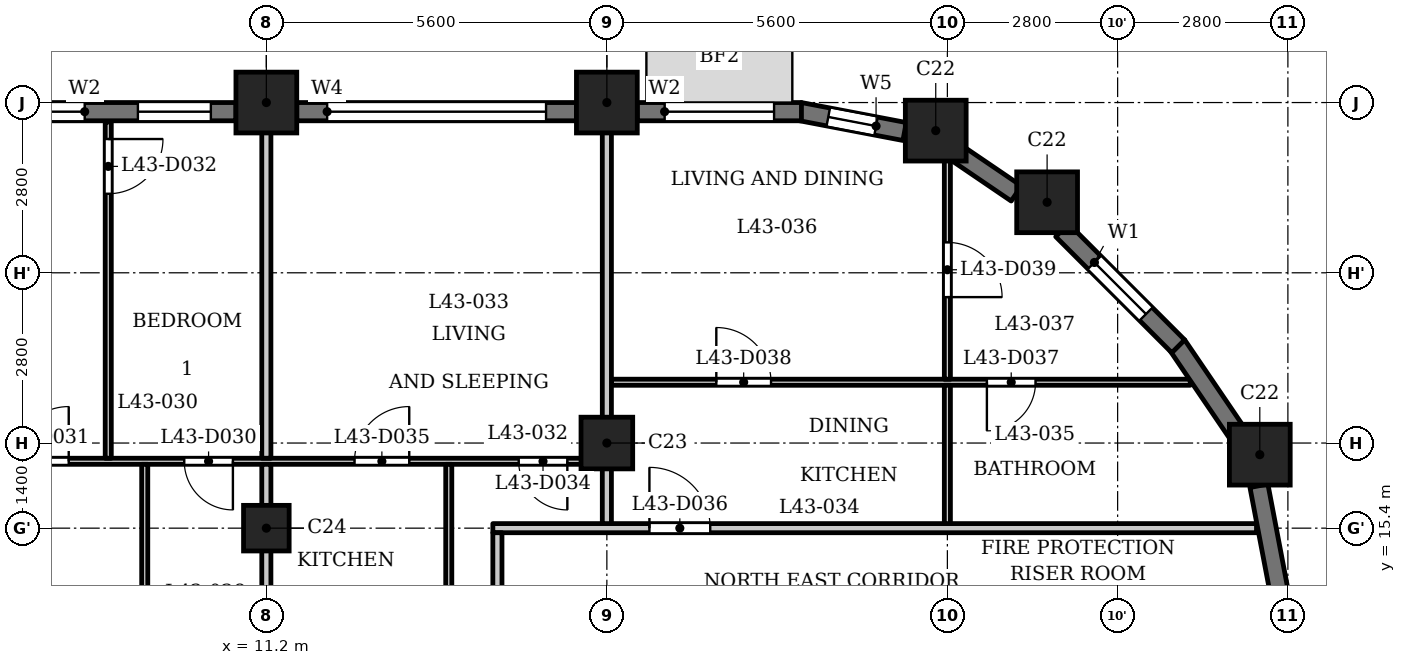
"""IFC4 building model, lengths in metres.
Left out: names, types, materials, properties, quantities, classifications, styles, units other than length and angle.
Written with IfcOpenShell. Run it as: python <this file> out.ifc"""

import sys

from ifc_helpers import new_model, si_unit, direction, frame, frame_2d, origin, origin_2d, place, context, subcontext, project, spatial, rectangle, extrude, element, fill, save


model = new_model("IFC4")
c1 = context("Model", 3, precision=1e-05, world=origin(), true_north=direction((0.0, 1.0)))
c2 = subcontext(c1, "Body", "Model", "MODEL_VIEW")
j1 = project(units=[si_unit("LENGTHUNIT", "METRE"), si_unit("PLANEANGLEUNIT", "RADIAN")], contexts=[c1])
p1 = place(None, origin())
s1 = spatial("IfcSite", under=j1, at=p1, CompositionType="ELEMENT")
p2 = place(p1, origin())
s2 = spatial("IfcBuilding", under=s1, at=p2, CompositionType="ELEMENT")
p3 = place(p2, frame((0.0, 0.0, 167.6)))
s3 = spatial("IfcBuildingStorey", under=s2, at=p3, CompositionType="ELEMENT", Elevation=167.6)
for number, where, z_axis, x_axis in (
    (1, (27.538, 16.609, 0.0), (0.0, 0.0, 1.0), (1.0, 0.0, 0.0)),
    (2, (24.04, 20.76, 0.0), (0.0, 0.0, 1.0), (1.0, 0.0, 0.0)),
    (3, (22.209, 21.938, 0.0), (0.0, 0.0, 1.0), (1.0, 0.0, 0.0)),
    (4, (16.8, 22.4, 0.0), (0.0, 0.0, 1.0), (1.0, 0.0, 0.0)),
    (5, (11.2, 22.4, 0.0), (0.0, 0.0, 1.0), (1.0, 0.0, 0.0)),
):
    element("IfcColumn", number, at=place(p3, frame(where, z_axis=z_axis, x_axis=x_axis)), inside=s3, PredefinedType="COLUMN", context=c2, shape_type="SweptSolid", body=[
        extrude(rectangle(XDim=1.0, YDim=1.0, at=origin_2d()), origin(), (0.0, 0.0, 1.0), 3.5),
    ])
p4 = place(p3, frame((16.8, 16.8, 0.0), z_axis=(0.0, 0.0, 1.0), x_axis=(1.0, 0.0, 0.0)))
e6 = element("IfcColumn", 6, at=p4, inside=s3, PredefinedType="COLUMN", context=c2, shape_type="SweptSolid", body=[
    extrude(rectangle(XDim=0.85, YDim=0.85, at=origin_2d()), origin(), (0.0, 0.0, 1.0), 3.5),
])
p5 = place(p3, frame((11.2, 15.4, 0.0), z_axis=(0.0, 0.0, 1.0), x_axis=(1.0, 0.0, 0.0)))
e7 = element("IfcColumn", 7, at=p5, inside=s3, PredefinedType="COLUMN", context=c2, shape_type="SweptSolid", body=[
    extrude(rectangle(XDim=0.75, YDim=0.75, at=origin_2d()), origin(), (0.0, 0.0, 1.0), 3.5),
])
for number, where, z_axis, x_axis in (
    (8, (27.853, 14.372, 0.0), (0.0, 0.0, 1.0), (-0.187, 0.982, 0.0)),
    (9, (27.166, 16.96, 0.0), (0.0, 0.0, 1.0), (-0.562, 0.827, 0.0)),
):
    element("IfcWall", number, at=place(p3, frame(where, z_axis=z_axis, x_axis=x_axis)), inside=s3, PredefinedType="SOLIDWALL", context=c2, shape_type="SweptSolid", body=[
        extrude(rectangle(XDim=1.756, YDim=0.3, at=frame_2d((0.878, 0.0))), origin(), (0.0, 0.0, 1.0), 2.45),
    ])
p6 = place(p3, frame((26.197, 18.391, 0.0), z_axis=(0.0, 0.0, 1.0), x_axis=(-0.707061571201, 0.707151988282, 0.0)))
e10 = element("IfcWall", 10, at=p6, inside=s3, PredefinedType="SOLIDWALL", context=c2, shape_type="SweptSolid", body=[
    extrude(rectangle(XDim=2.7, YDim=0.3, at=frame_2d((1.35, 0.0))), origin(), (0.0, 0.0, 1.0), 2.45),
])
p7 = place(p6, frame((0.75, 0.0, 0.6)))
e11 = element("IfcOpeningElement", 11, at=p7, cuts=e10, PredefinedType="OPENING", context=c2, shape_type="SweptSolid", body=[
    extrude(rectangle(XDim=1.2, YDim=1.55, at=frame_2d((0.6, 0.775))), frame((0.0, 0.16, 0.0), z_axis=(0.0, -1.0, 0.0), x_axis=(1.0, 0.0, 0.0)), (0.0, 0.0, 1.0), 0.32),
])
p8 = place(p3, frame((23.534, 20.904, 0.0), z_axis=(0.0, 0.0, 1.0), x_axis=(-0.827103906596, 0.56204904385, 0.0)))
e12 = element("IfcWall", 12, at=p8, inside=s3, PredefinedType="SOLIDWALL", context=c2, shape_type="SweptSolid", body=[
    extrude(rectangle(XDim=1.177, YDim=0.3, at=frame_2d((0.589, 0.0))), origin(), (0.0, 0.0, 1.0), 3.2),
])
p9 = place(p3, frame((21.697, 21.924, 0.0), z_axis=(0.0, 0.0, 1.0), x_axis=(-0.982284988433, 0.187393173565, 0.0)))
e13 = element("IfcWall", 13, at=p9, inside=s3, PredefinedType="SOLIDWALL", context=c2, shape_type="SweptSolid", body=[
    extrude(rectangle(XDim=1.756, YDim=0.3, at=frame_2d((0.878, 0.0))), origin(), (0.0, 0.0, 1.0), 2.45),
])
p10 = place(p9, frame((0.478, 0.0, 0.6)))
e14 = element("IfcOpeningElement", 14, at=p10, cuts=e13, PredefinedType="OPENING", context=c2, shape_type="SweptSolid", body=[
    extrude(rectangle(XDim=0.8, YDim=1.55, at=frame_2d((0.4, 0.775))), frame((0.0, 0.16, 0.0), z_axis=(0.0, -1.0, 0.0), x_axis=(1.0, 0.0, 0.0)), (0.0, 0.0, 1.0), 0.32),
])
p11 = place(p3, frame((20.0, 22.25, 0.0), z_axis=(0.0, 0.0, 1.0), x_axis=(-1.0, 0.0, 0.0)))
e15 = element("IfcWall", 15, at=p11, inside=s3, PredefinedType="SOLIDWALL", context=c2, shape_type="SweptSolid", body=[
    extrude(rectangle(XDim=2.7, YDim=0.3, at=frame_2d((1.35, 0.0))), origin(), (0.0, 0.0, 1.0), 2.45),
])
p12 = place(p11, frame((0.45, 0.0, 0.9)))
e16 = element("IfcOpeningElement", 16, at=p12, cuts=e15, PredefinedType="OPENING", context=c2, shape_type="SweptSolid", body=[
    extrude(rectangle(XDim=1.8, YDim=1.25, at=frame_2d((0.9, 0.625))), frame((0.0, 0.16, 0.0), z_axis=(0.0, -1.0, 0.0), x_axis=(1.0, 0.0, 0.0)), (0.0, 0.0, 1.0), 0.32),
])
p13 = place(p3, frame((16.3, 22.25, 0.0), z_axis=(0.0, 0.0, 1.0), x_axis=(-1.0, 0.0, 0.0)))
e17 = element("IfcWall", 17, at=p13, inside=s3, PredefinedType="SOLIDWALL", context=c2, shape_type="SweptSolid", body=[
    extrude(rectangle(XDim=4.6, YDim=0.3, at=frame_2d((2.3, 0.0))), origin(), (0.0, 0.0, 1.0), 2.45),
])
p14 = place(p13, frame((0.5, 0.0, 1.2)))
e18 = element("IfcOpeningElement", 18, at=p14, cuts=e17, PredefinedType="OPENING", context=c2, shape_type="SweptSolid", body=[
    extrude(rectangle(XDim=3.6, YDim=0.95, at=frame_2d((1.8, 0.475))), frame((0.0, 0.16, 0.0), z_axis=(0.0, -1.0, 0.0), x_axis=(1.0, 0.0, 0.0)), (0.0, 0.0, 1.0), 0.32),
])
p15 = place(p3, frame((10.7, 22.25, 0.0), z_axis=(0.0, 0.0, 1.0), x_axis=(-1.0, 0.0, 0.0)))
e19 = element("IfcWall", 19, at=p15, inside=s3, PredefinedType="SOLIDWALL", context=c2, shape_type="SweptSolid", body=[
    extrude(rectangle(XDim=4.6, YDim=0.3, at=frame_2d((2.3, 0.0))), origin(), (0.0, 0.0, 1.0), 2.45),
])
p16 = place(p15, frame((0.413, 0.0, 0.6)))
e20 = element("IfcOpeningElement", 20, at=p16, cuts=e19, PredefinedType="OPENING", context=c2, shape_type="SweptSolid", body=[
    extrude(rectangle(XDim=1.2, YDim=1.55, at=frame_2d((0.6, 0.775))), frame((0.0, 0.16, 0.0), z_axis=(0.0, -1.0, 0.0), x_axis=(1.0, 0.0, 0.0)), (0.0, 0.0, 1.0), 0.32),
])
p17 = place(p15, frame((2.488, 0.0, 0.9)))
e21 = element("IfcOpeningElement", 21, at=p17, cuts=e19, PredefinedType="OPENING", context=c2, shape_type="SweptSolid", body=[
    extrude(rectangle(XDim=1.8, YDim=1.25, at=frame_2d((0.9, 0.625))), frame((0.0, 0.16, 0.0), z_axis=(0.0, -1.0, 0.0), x_axis=(1.0, 0.0, 0.0)), (0.0, 0.0, 1.0), 0.32),
])
p18 = place(p3, frame((14.925, 15.4, 0.0), z_axis=(0.0, 0.0, 1.0), x_axis=(1.0, 0.0, 0.0)))
e22 = element("IfcWall", 22, at=p18, inside=s3, PredefinedType="PARTITIONING", context=c2, shape_type="SweptSolid", body=[
    extrude(rectangle(XDim=12.559, YDim=0.15, at=frame_2d((6.279, 0.0))), origin(), (0.0, 0.0, 1.0), 3.2),
])
p19 = place(p18, frame((2.575, 0.0, 0.0)))
e23 = element("IfcOpeningElement", 23, at=p19, cuts=e22, PredefinedType="OPENING", context=c2, shape_type="SweptSolid", body=[
    extrude(rectangle(XDim=1.0, YDim=2.1, at=frame_2d((0.5, 1.05))), frame((0.0, 0.085, 0.0), z_axis=(0.0, -1.0, 0.0), x_axis=(1.0, 0.0, 0.0)), (0.0, 0.0, 1.0), 0.17),
])
p20 = place(p3, frame((-16.725, 16.5, 0.0), z_axis=(0.0, 0.0, 1.0), x_axis=(1.0, 0.0, 0.0)))
e24 = element("IfcWall", 24, at=p20, inside=s3, PredefinedType="PARTITIONING", context=c2, shape_type="SweptSolid", body=[
    extrude(rectangle(XDim=33.45, YDim=0.1, at=frame_2d((16.725, 0.0))), origin(), (0.0, 0.0, 1.0), 3.2),
])
p21 = place(p20, frame((0.575, 0.0, 0.0)))
e25 = element("IfcOpeningElement", 25, at=p21, cuts=e24, PredefinedType="OPENING", context=c2, shape_type="SweptSolid", body=[
    extrude(rectangle(XDim=0.8, YDim=2.1, at=frame_2d((0.4, 1.05))), frame((0.0, 0.06, 0.0), z_axis=(0.0, -1.0, 0.0), x_axis=(1.0, 0.0, 0.0)), (0.0, 0.0, 1.0), 0.12),
])
p22 = place(p20, frame((3.225, 0.0, 0.0)))
e26 = element("IfcOpeningElement", 26, at=p22, cuts=e24, PredefinedType="OPENING", context=c2, shape_type="SweptSolid", body=[
    extrude(rectangle(XDim=0.9, YDim=2.1, at=frame_2d((0.45, 1.05))), frame((0.0, 0.06, 0.0), z_axis=(0.0, -1.0, 0.0), x_axis=(1.0, 0.0, 0.0)), (0.0, 0.0, 1.0), 0.12),
])
p23 = place(p20, frame((6.775, 0.0, 0.0)))
e27 = element("IfcOpeningElement", 27, at=p23, cuts=e24, PredefinedType="OPENING", context=c2, shape_type="SweptSolid", body=[
    extrude(rectangle(XDim=0.9, YDim=2.1, at=frame_2d((0.45, 1.05))), frame((0.0, 0.06, 0.0), z_axis=(0.0, -1.0, 0.0), x_axis=(1.0, 0.0, 0.0)), (0.0, 0.0, 1.0), 0.12),
])
p24 = place(p20, frame((8.825, 0.0, 0.0)))
e28 = element("IfcOpeningElement", 28, at=p24, cuts=e24, PredefinedType="OPENING", context=c2, shape_type="SweptSolid", body=[
    extrude(rectangle(XDim=0.9, YDim=2.1, at=frame_2d((0.45, 1.05))), frame((0.0, 0.06, 0.0), z_axis=(0.0, -1.0, 0.0), x_axis=(1.0, 0.0, 0.0)), (0.0, 0.0, 1.0), 0.12),
])
p25 = place(p20, frame((20.775, 0.0, 0.0)))
e29 = element("IfcOpeningElement", 29, at=p25, cuts=e24, PredefinedType="OPENING", context=c2, shape_type="SweptSolid", body=[
    extrude(rectangle(XDim=0.8, YDim=2.1, at=frame_2d((0.4, 1.05))), frame((0.0, 0.06, 0.0), z_axis=(0.0, -1.0, 0.0), x_axis=(1.0, 0.0, 0.0)), (0.0, 0.0, 1.0), 0.12),
])
p26 = place(p20, frame((17.325, 0.0, 0.0)))
e30 = element("IfcOpeningElement", 30, at=p26, cuts=e24, PredefinedType="OPENING", context=c2, shape_type="SweptSolid", body=[
    extrude(rectangle(XDim=0.9, YDim=2.1, at=frame_2d((0.45, 1.05))), frame((0.0, 0.06, 0.0), z_axis=(0.0, -1.0, 0.0), x_axis=(1.0, 0.0, 0.0)), (0.0, 0.0, 1.0), 0.12),
])
p27 = place(p20, frame((12.375, 0.0, 0.0)))
e31 = element("IfcOpeningElement", 31, at=p27, cuts=e24, PredefinedType="OPENING", context=c2, shape_type="SweptSolid", body=[
    extrude(rectangle(XDim=0.9, YDim=2.1, at=frame_2d((0.45, 1.05))), frame((0.0, 0.06, 0.0), z_axis=(0.0, -1.0, 0.0), x_axis=(1.0, 0.0, 0.0)), (0.0, 0.0, 1.0), 0.12),
])
p28 = place(p20, frame((14.425, 0.0, 0.0)))
e32 = element("IfcOpeningElement", 32, at=p28, cuts=e24, PredefinedType="OPENING", context=c2, shape_type="SweptSolid", body=[
    extrude(rectangle(XDim=0.9, YDim=2.1, at=frame_2d((0.45, 1.05))), frame((0.0, 0.06, 0.0), z_axis=(0.0, -1.0, 0.0), x_axis=(1.0, 0.0, 0.0)), (0.0, 0.0, 1.0), 0.12),
])
p29 = place(p20, frame((26.575, 0.0, 0.0)))
e33 = element("IfcOpeningElement", 33, at=p29, cuts=e24, PredefinedType="OPENING", context=c2, shape_type="SweptSolid", body=[
    extrude(rectangle(XDim=0.8, YDim=2.1, at=frame_2d((0.4, 1.05))), frame((0.0, 0.06, 0.0), z_axis=(0.0, -1.0, 0.0), x_axis=(1.0, 0.0, 0.0)), (0.0, 0.0, 1.0), 0.12),
])
p30 = place(p20, frame((23.775, 0.0, 0.0)))
e34 = element("IfcOpeningElement", 34, at=p30, cuts=e24, PredefinedType="OPENING", context=c2, shape_type="SweptSolid", body=[
    extrude(rectangle(XDim=0.9, YDim=2.1, at=frame_2d((0.45, 1.05))), frame((0.0, 0.06, 0.0), z_axis=(0.0, -1.0, 0.0), x_axis=(1.0, 0.0, 0.0)), (0.0, 0.0, 1.0), 0.12),
])
p31 = place(p20, frame((32.075, 0.0, 0.0)))
e35 = element("IfcOpeningElement", 35, at=p31, cuts=e24, PredefinedType="OPENING", context=c2, shape_type="SweptSolid", body=[
    extrude(rectangle(XDim=0.8, YDim=2.1, at=frame_2d((0.4, 1.05))), frame((0.0, 0.06, 0.0), z_axis=(0.0, -1.0, 0.0), x_axis=(1.0, 0.0, 0.0)), (0.0, 0.0, 1.0), 0.12),
])
p32 = place(p20, frame((29.375, 0.0, 0.0)))
e36 = element("IfcOpeningElement", 36, at=p32, cuts=e24, PredefinedType="OPENING", context=c2, shape_type="SweptSolid", body=[
    extrude(rectangle(XDim=0.9, YDim=2.1, at=frame_2d((0.45, 1.05))), frame((0.0, 0.06, 0.0), z_axis=(0.0, -1.0, 0.0), x_axis=(1.0, 0.0, 0.0)), (0.0, 0.0, 1.0), 0.12),
])
p33 = place(p3, frame((16.875, 17.8, 0.0), z_axis=(0.0, 0.0, 1.0), x_axis=(1.0, 0.0, 0.0)))
e37 = element("IfcWall", 37, at=p33, inside=s3, PredefinedType="PARTITIONING", context=c2, shape_type="SweptSolid", body=[
    extrude(rectangle(XDim=9.519, YDim=0.1, at=frame_2d((4.76, 0.0))), origin(), (0.0, 0.0, 1.0), 3.2),
])
p34 = place(p33, frame((6.175, 0.0, 0.0)))
e38 = element("IfcOpeningElement", 38, at=p34, cuts=e37, PredefinedType="OPENING", context=c2, shape_type="SweptSolid", body=[
    extrude(rectangle(XDim=0.8, YDim=2.1, at=frame_2d((0.4, 1.05))), frame((0.0, 0.06, 0.0), z_axis=(0.0, -1.0, 0.0), x_axis=(1.0, 0.0, 0.0)), (0.0, 0.0, 1.0), 0.12),
])
p35 = place(p33, frame((1.725, 0.0, 0.0)))
e39 = element("IfcOpeningElement", 39, at=p35, cuts=e37, PredefinedType="OPENING", context=c2, shape_type="SweptSolid", body=[
    extrude(rectangle(XDim=0.9, YDim=2.1, at=frame_2d((0.45, 1.05))), frame((0.0, 0.06, 0.0), z_axis=(0.0, -1.0, 0.0), x_axis=(1.0, 0.0, 0.0)), (0.0, 0.0, 1.0), 0.12),
])
p36 = place(p3, frame((8.6, 16.55, 0.0), z_axis=(0.0, 0.0, 1.0), x_axis=(0.0, 1.0, 0.0)))
e40 = element("IfcWall", 40, at=p36, inside=s3, PredefinedType="PARTITIONING", context=c2, shape_type="SweptSolid", body=[
    extrude(rectangle(XDim=5.53, YDim=0.1, at=frame_2d((2.765, 0.0))), origin(), (0.0, 0.0, 1.0), 3.2),
])
p37 = place(p36, frame((4.35, 0.0, 0.0)))
e41 = element("IfcOpeningElement", 41, at=p37, cuts=e40, PredefinedType="OPENING", context=c2, shape_type="SweptSolid", body=[
    extrude(rectangle(XDim=0.9, YDim=2.1, at=frame_2d((0.45, 1.05))), frame((0.0, 0.06, 0.0), z_axis=(0.0, -1.0, 0.0), x_axis=(1.0, 0.0, 0.0)), (0.0, 0.0, 1.0), 0.12),
])
p38 = place(p3, frame((9.2, 13.275, 0.0), z_axis=(0.0, 0.0, 1.0), x_axis=(0.0, 1.0, 0.0)))
e42 = element("IfcWall", 42, at=p38, inside=s3, PredefinedType="PARTITIONING", context=c2, shape_type="SweptSolid", body=[
    extrude(rectangle(XDim=3.175, YDim=0.1, at=frame_2d((1.587, 0.0))), origin(), (0.0, 0.0, 1.0), 3.2),
])
p39 = place(p3, frame((11.2, 13.275, 0.0), z_axis=(0.0, 0.0, 1.0), x_axis=(0.0, 1.0, 0.0)))
e43 = element("IfcWall", 43, at=p39, inside=s3, PredefinedType="PARTITIONING", context=c2, shape_type="SweptSolid", body=[
    extrude(rectangle(XDim=3.175, YDim=0.15, at=frame_2d((1.587, 0.0))), origin(), (0.0, 0.0, 1.0), 3.2),
])
p40 = place(p3, frame((11.2, 16.55, 0.0), z_axis=(0.0, 0.0, 1.0), x_axis=(0.0, 1.0, 0.0)))
e44 = element("IfcWall", 44, at=p40, inside=s3, PredefinedType="PARTITIONING", context=c2, shape_type="SweptSolid", body=[
    extrude(rectangle(XDim=6.33, YDim=0.15, at=frame_2d((3.165, 0.0))), origin(), (0.0, 0.0, 1.0), 3.2),
])
p41 = place(p3, frame((14.2, 13.275, 0.0), z_axis=(0.0, 0.0, 1.0), x_axis=(0.0, 1.0, 0.0)))
e45 = element("IfcWall", 45, at=p41, inside=s3, PredefinedType="PARTITIONING", context=c2, shape_type="SweptSolid", body=[
    extrude(rectangle(XDim=3.175, YDim=0.1, at=frame_2d((1.587, 0.0))), origin(), (0.0, 0.0, 1.0), 3.2),
])
p42 = place(p3, frame((15.0, 13.275, 0.0), z_axis=(0.0, 0.0, 1.0), x_axis=(0.0, 1.0, 0.0)))
e46 = element("IfcWall", 46, at=p42, inside=s3, PredefinedType="PARTITIONING", context=c2, shape_type="SweptSolid", body=[
    extrude(rectangle(XDim=2.05, YDim=0.15, at=frame_2d((1.025, 0.0))), origin(), (0.0, 0.0, 1.0), 3.2),
])
p43 = place(p3, frame((16.8, 15.475, 0.0), z_axis=(0.0, 0.0, 1.0), x_axis=(0.0, 1.0, 0.0)))
e47 = element("IfcWall", 47, at=p43, inside=s3, PredefinedType="PARTITIONING", context=c2, shape_type="SweptSolid", body=[
    extrude(rectangle(XDim=7.405, YDim=0.15, at=frame_2d((3.702, 0.0))), origin(), (0.0, 0.0, 1.0), 3.2),
])
p44 = place(p3, frame((22.4, 15.475, 0.0), z_axis=(0.0, 0.0, 1.0), x_axis=(0.0, 1.0, 0.0)))
e48 = element("IfcWall", 48, at=p44, inside=s3, PredefinedType="PARTITIONING", context=c2, shape_type="SweptSolid", body=[
    extrude(rectangle(XDim=2.275, YDim=0.1, at=frame_2d((1.137, 0.0))), origin(), (0.0, 0.0, 1.0), 3.2),
])
p45 = place(p3, frame((22.4, 17.85, 0.0), z_axis=(0.0, 0.0, 1.0), x_axis=(0.0, 1.0, 0.0)))
e49 = element("IfcWall", 49, at=p45, inside=s3, PredefinedType="PARTITIONING", context=c2, shape_type="SweptSolid", body=[
    extrude(rectangle(XDim=3.87, YDim=0.1, at=frame_2d((1.935, 0.0))), origin(), (0.0, 0.0, 1.0), 3.2),
])
p46 = place(p45, frame((1.35, 0.0, 0.0)))
e50 = element("IfcOpeningElement", 50, at=p46, cuts=e49, PredefinedType="OPENING", context=c2, shape_type="SweptSolid", body=[
    extrude(rectangle(XDim=0.9, YDim=2.1, at=frame_2d((0.45, 1.05))), frame((0.0, 0.06, 0.0), z_axis=(0.0, -1.0, 0.0), x_axis=(1.0, 0.0, 0.0)), (0.0, 0.0, 1.0), 0.12),
])
p47 = place(p29, origin())
e51 = element("IfcDoor", 51, at=p47, inside=s3, OperationType="SINGLE_SWING_RIGHT", PredefinedType="DOOR", context=c2, shape_type="SweptSolid", body=[
    extrude(rectangle(XDim=0.8, YDim=2.1, at=frame_2d((0.4, 1.05))), frame((0.0, 0.025, 0.0), z_axis=(0.0, -1.0, 0.0), x_axis=(1.0, 0.0, 0.0)), (0.0, 0.0, 1.0), 0.05),
])
fill(e33, e51)
p48 = place(p30, origin())
e52 = element("IfcDoor", 52, at=p48, inside=s3, OperationType="SINGLE_SWING_LEFT", PredefinedType="DOOR", context=c2, shape_type="SweptSolid", body=[
    extrude(rectangle(XDim=0.9, YDim=2.1, at=frame_2d((0.45, 1.05))), frame((0.0, 0.025, 0.0), z_axis=(0.0, -1.0, 0.0), x_axis=(1.0, 0.0, 0.0)), (0.0, 0.0, 1.0), 0.05),
])
fill(e34, e52)
p49 = place(p37, origin())
e53 = element("IfcDoor", 53, at=p49, inside=s3, OperationType="SINGLE_SWING_RIGHT", PredefinedType="DOOR", context=c2, shape_type="SweptSolid", body=[
    extrude(rectangle(XDim=0.9, YDim=2.1, at=frame_2d((0.45, 1.05))), frame((0.0, 0.025, 0.0), z_axis=(0.0, -1.0, 0.0), x_axis=(1.0, 0.0, 0.0)), (0.0, 0.0, 1.0), 0.05),
])
fill(e41, e53)
p50 = place(p31, origin())
e54 = element("IfcDoor", 54, at=p50, inside=s3, OperationType="SINGLE_SWING_RIGHT", PredefinedType="DOOR", context=c2, shape_type="SweptSolid", body=[
    extrude(rectangle(XDim=0.8, YDim=2.1, at=frame_2d((0.4, 1.05))), frame((0.0, 0.025, 0.0), z_axis=(0.0, -1.0, 0.0), x_axis=(1.0, 0.0, 0.0)), (0.0, 0.0, 1.0), 0.05),
])
fill(e35, e54)
p51 = place(p32, origin())
e55 = element("IfcDoor", 55, at=p51, inside=s3, OperationType="SINGLE_SWING_LEFT", PredefinedType="DOOR", context=c2, shape_type="SweptSolid", body=[
    extrude(rectangle(XDim=0.9, YDim=2.1, at=frame_2d((0.45, 1.05))), frame((0.0, 0.025, 0.0), z_axis=(0.0, -1.0, 0.0), x_axis=(1.0, 0.0, 0.0)), (0.0, 0.0, 1.0), 0.05),
])
fill(e36, e55)
p52 = place(p19, origin())
e56 = element("IfcDoor", 56, at=p52, inside=s3, OperationType="SINGLE_SWING_RIGHT", PredefinedType="DOOR", context=c2, shape_type="SweptSolid", body=[
    extrude(rectangle(XDim=1.0, YDim=2.1, at=frame_2d((0.5, 1.05))), frame((0.0, 0.025, 0.0), z_axis=(0.0, -1.0, 0.0), x_axis=(1.0, 0.0, 0.0)), (0.0, 0.0, 1.0), 0.05),
])
fill(e23, e56)
p53 = place(p34, origin())
e57 = element("IfcDoor", 57, at=p53, inside=s3, OperationType="SINGLE_SWING_LEFT", PredefinedType="DOOR", context=c2, shape_type="SweptSolid", body=[
    extrude(rectangle(XDim=0.8, YDim=2.1, at=frame_2d((0.4, 1.05))), frame((0.0, 0.025, 0.0), z_axis=(0.0, -1.0, 0.0), x_axis=(1.0, 0.0, 0.0)), (0.0, 0.0, 1.0), 0.05),
])
fill(e38, e57)
p54 = place(p35, origin())
e58 = element("IfcDoor", 58, at=p54, inside=s3, OperationType="SINGLE_SWING_RIGHT", PredefinedType="DOOR", context=c2, shape_type="SweptSolid", body=[
    extrude(rectangle(XDim=0.9, YDim=2.1, at=frame_2d((0.45, 1.05))), frame((0.0, 0.025, 0.0), z_axis=(0.0, -1.0, 0.0), x_axis=(1.0, 0.0, 0.0)), (0.0, 0.0, 1.0), 0.05),
])
fill(e39, e58)
p55 = place(p46, origin())
e59 = element("IfcDoor", 59, at=p55, inside=s3, OperationType="SINGLE_SWING_LEFT", PredefinedType="DOOR", context=c2, shape_type="SweptSolid", body=[
    extrude(rectangle(XDim=0.9, YDim=2.1, at=frame_2d((0.45, 1.05))), frame((0.0, 0.025, 0.0), z_axis=(0.0, -1.0, 0.0), x_axis=(1.0, 0.0, 0.0)), (0.0, 0.0, 1.0), 0.05),
])
fill(e50, e59)
p56 = place(p7, origin())
e60 = element("IfcWindow", 60, at=p56, inside=s3, PartitioningType="SINGLE_PANEL", PredefinedType="WINDOW", context=c2, shape_type="SweptSolid", body=[
    extrude(rectangle(XDim=1.2, YDim=1.55, at=frame_2d((0.6, 0.775))), frame((0.0, 0.03, 0.0), z_axis=(0.0, -1.0, 0.0), x_axis=(1.0, 0.0, 0.0)), (0.0, 0.0, 1.0), 0.06),
])
fill(e11, e60)
p57 = place(p10, origin())
e61 = element("IfcWindow", 61, at=p57, inside=s3, PartitioningType="SINGLE_PANEL", PredefinedType="WINDOW", context=c2, shape_type="SweptSolid", body=[
    extrude(rectangle(XDim=0.8, YDim=1.55, at=frame_2d((0.4, 0.775))), frame((0.0, 0.03, 0.0), z_axis=(0.0, -1.0, 0.0), x_axis=(1.0, 0.0, 0.0)), (0.0, 0.0, 1.0), 0.06),
])
fill(e14, e61)
p58 = place(p12, origin())
e62 = element("IfcWindow", 62, at=p58, inside=s3, PartitioningType="SINGLE_PANEL", PredefinedType="WINDOW", context=c2, shape_type="SweptSolid", body=[
    extrude(rectangle(XDim=1.8, YDim=1.25, at=frame_2d((0.9, 0.625))), frame((0.0, 0.03, 0.0), z_axis=(0.0, -1.0, 0.0), x_axis=(1.0, 0.0, 0.0)), (0.0, 0.0, 1.0), 0.06),
])
fill(e16, e62)
p59 = place(p14, origin())
e63 = element("IfcWindow", 63, at=p59, inside=s3, PartitioningType="SINGLE_PANEL", PredefinedType="WINDOW", context=c2, shape_type="SweptSolid", body=[
    extrude(rectangle(XDim=3.6, YDim=0.95, at=frame_2d((1.8, 0.475))), frame((0.0, 0.03, 0.0), z_axis=(0.0, -1.0, 0.0), x_axis=(1.0, 0.0, 0.0)), (0.0, 0.0, 1.0), 0.06),
])
fill(e18, e63)
p60 = place(p16, origin())
e64 = element("IfcWindow", 64, at=p60, inside=s3, PartitioningType="SINGLE_PANEL", PredefinedType="WINDOW", context=c2, shape_type="SweptSolid", body=[
    extrude(rectangle(XDim=1.2, YDim=1.55, at=frame_2d((0.6, 0.775))), frame((0.0, 0.03, 0.0), z_axis=(0.0, -1.0, 0.0), x_axis=(1.0, 0.0, 0.0)), (0.0, 0.0, 1.0), 0.06),
])
fill(e20, e64)
p61 = place(p17, origin())
e65 = element("IfcWindow", 65, at=p61, inside=s3, PartitioningType="SINGLE_PANEL", PredefinedType="WINDOW", context=c2, shape_type="SweptSolid", body=[
    extrude(rectangle(XDim=1.8, YDim=1.25, at=frame_2d((0.9, 0.625))), frame((0.0, 0.03, 0.0), z_axis=(0.0, -1.0, 0.0), x_axis=(1.0, 0.0, 0.0)), (0.0, 0.0, 1.0), 0.06),
])
fill(e21, e65)
save(model, sys.argv[1])
